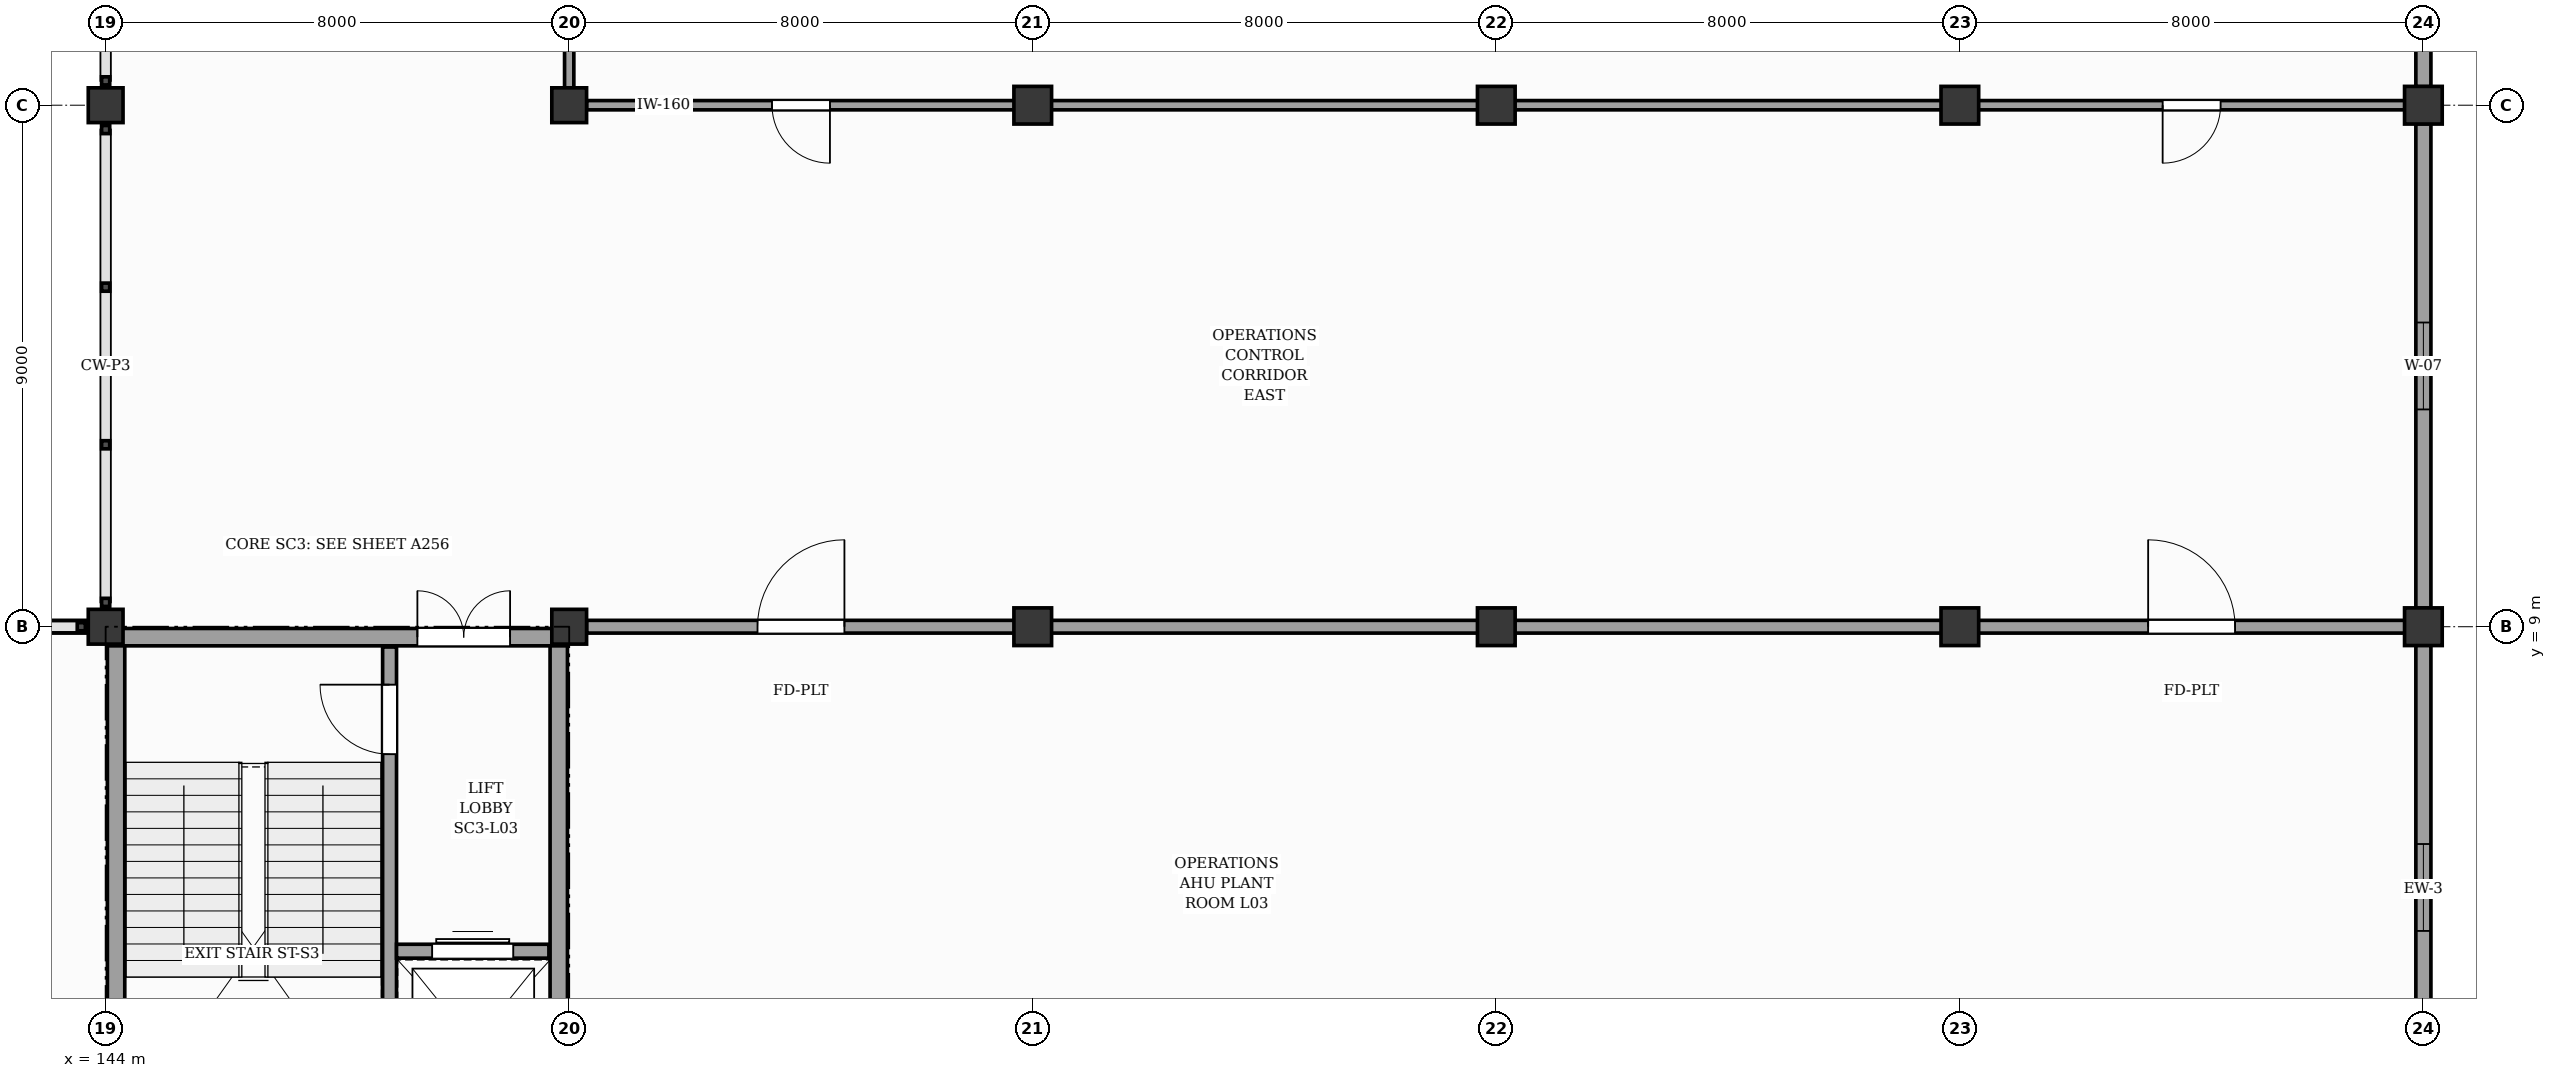
"""IFC4 building model, lengths in metres.
Left out: names, types, materials, properties, quantities, classifications, styles, units other than length and angle.
Written with IfcOpenShell. Run it as: python <this file> out.ifc"""

import sys

from ifc_helpers import new_model, si_unit, direction, frame, frame_2d, origin, origin_2d, place, context, subcontext, project, spatial, rectangle, extrude, element, fill, save


model = new_model("IFC4")
c1 = context("Model", 3, precision=1e-05, world=origin(), true_north=direction((0.0, 1.0)))
c2 = subcontext(c1, "Body", "Model", "MODEL_VIEW")
j1 = project(units=[si_unit("LENGTHUNIT", "METRE"), si_unit("PLANEANGLEUNIT", "RADIAN")], contexts=[c1])
p1 = place(None, origin())
s1 = spatial("IfcSite", under=j1, at=p1, CompositionType="ELEMENT")
p2 = place(p1, origin())
s2 = spatial("IfcBuilding", under=s1, at=p2, CompositionType="ELEMENT")
p3 = place(p2, frame((0.0, 0.0, 16.2)))
s3 = spatial("IfcBuildingStorey", under=s2, at=p3, CompositionType="ELEMENT", Elevation=16.2)
for number, where, z_axis, x_axis in (
    (1, (144.0, 9.0, 0.0), (0.0, 0.0, 1.0), (1.0, 0.0, 0.0)),
    (2, (144.0, 18.0, 0.0), (0.0, 0.0, 1.0), (1.0, 0.0, 0.0)),
    (3, (152.0, 9.0, 0.0), (0.0, 0.0, 1.0), (1.0, 0.0, 0.0)),
    (4, (152.0, 18.0, 0.0), (0.0, 0.0, 1.0), (1.0, 0.0, 0.0)),
):
    element("IfcColumn", number, at=place(p3, frame(where, z_axis=z_axis, x_axis=x_axis)), inside=s3, PredefinedType="COLUMN", context=c2, shape_type="SweptSolid", body=[
        extrude(rectangle(XDim=0.6, YDim=0.6, at=origin_2d()), origin(), (0.0, 0.0, 1.0), 4.2),
    ])
for number, where, z_axis, x_axis in (
    (5, (160.0, 9.0, 0.0), (0.0, 0.0, 1.0), (1.0, 0.0, 0.0)),
    (6, (160.0, 18.0, 0.0), (0.0, 0.0, 1.0), (1.0, 0.0, 0.0)),
    (7, (168.0, 9.0, 0.0), (0.0, 0.0, 1.0), (1.0, 0.0, 0.0)),
    (8, (168.0, 18.0, 0.0), (0.0, 0.0, 1.0), (1.0, 0.0, 0.0)),
    (9, (176.0, 9.0, 0.0), (0.0, 0.0, 1.0), (1.0, 0.0, 0.0)),
    (10, (176.0, 18.0, 0.0), (0.0, 0.0, 1.0), (1.0, 0.0, 0.0)),
    (11, (184.0, 9.0, 0.0), (0.0, 0.0, 1.0), (1.0, 0.0, 0.0)),
    (12, (184.0, 18.0, 0.0), (0.0, 0.0, 1.0), (1.0, 0.0, 0.0)),
):
    element("IfcColumn", number, at=place(p3, frame(where, z_axis=z_axis, x_axis=x_axis)), inside=s3, PredefinedType="COLUMN", context=c2, shape_type="SweptSolid", body=[
        extrude(rectangle(XDim=0.65, YDim=0.65, at=origin_2d()), origin(), (0.0, 0.0, 1.0), 4.2),
    ])
p4 = place(p3, frame((184.0, 0.27, 0.0), z_axis=(0.0, 0.0, 1.0), x_axis=(0.0, 1.0, 0.0)))
e13 = element("IfcWall", 13, at=p4, inside=s3, PredefinedType="SOLIDWALL", context=c2, shape_type="SweptSolid", body=[
    extrude(rectangle(XDim=8.41, YDim=0.26, at=frame_2d((4.205, 0.0))), origin(), (0.0, 0.0, 1.0), 3.13),
])
p5 = place(p4, frame((3.48, 0.0, 0.95)))
e14 = element("IfcOpeningElement", 14, at=p5, cuts=e13, PredefinedType="OPENING", context=c2, shape_type="SweptSolid", body=[
    extrude(rectangle(XDim=1.5, YDim=1.9, at=frame_2d((0.75, 0.95))), frame((0.0, 0.14, 0.0), z_axis=(0.0, -1.0, 0.0), x_axis=(1.0, 0.0, 0.0)), (0.0, 0.0, 1.0), 0.28),
])
p6 = place(p3, frame((184.0, 9.32, 0.0), z_axis=(0.0, 0.0, 1.0), x_axis=(0.0, 1.0, 0.0)))
e15 = element("IfcWall", 15, at=p6, inside=s3, PredefinedType="SOLIDWALL", context=c2, shape_type="SweptSolid", body=[
    extrude(rectangle(XDim=8.36, YDim=0.26, at=frame_2d((4.18, 0.0))), origin(), (0.0, 0.0, 1.0), 3.13),
])
p7 = place(p6, frame((3.43, 0.0, 0.95)))
e16 = element("IfcOpeningElement", 16, at=p7, cuts=e15, PredefinedType="OPENING", context=c2, shape_type="SweptSolid", body=[
    extrude(rectangle(XDim=1.5, YDim=1.9, at=frame_2d((0.75, 0.95))), frame((0.0, 0.14, 0.0), z_axis=(0.0, -1.0, 0.0), x_axis=(1.0, 0.0, 0.0)), (0.0, 0.0, 1.0), 0.28),
])
p8 = place(p3, frame((184.0, 18.32, 0.0), z_axis=(0.0, 0.0, 1.0), x_axis=(0.0, 1.0, 0.0)))
e17 = element("IfcWall", 17, at=p8, inside=s3, PredefinedType="SOLIDWALL", context=c2, shape_type="SweptSolid", body=[
    extrude(rectangle(XDim=8.36, YDim=0.26, at=frame_2d((4.18, 0.0))), origin(), (0.0, 0.0, 1.0), 3.13),
])
p9 = place(p8, frame((3.43, 0.0, 0.95)))
e18 = element("IfcOpeningElement", 18, at=p9, cuts=e17, PredefinedType="OPENING", context=c2, shape_type="SweptSolid", body=[
    extrude(rectangle(XDim=1.5, YDim=1.9, at=frame_2d((0.75, 0.95))), frame((0.0, 0.14, 0.0), z_axis=(0.0, -1.0, 0.0), x_axis=(1.0, 0.0, 0.0)), (0.0, 0.0, 1.0), 0.28),
])
p10 = place(p3, frame((148.9, 0.35, 0.0), z_axis=(0.0, 0.0, 1.0), x_axis=(0.0, 1.0, 0.0)))
e19 = element("IfcWall", 19, at=p10, inside=s3, PredefinedType="SHEAR", context=c2, shape_type="SweptSolid", body=[
    extrude(rectangle(XDim=8.3, YDim=0.24, at=frame_2d((4.15, 0.0))), origin(), (0.0, 0.0, 1.0), 3.92),
])
p11 = place(p10, frame((6.45, 0.0, 0.0)))
e20 = element("IfcOpeningElement", 20, at=p11, cuts=e19, PredefinedType="OPENING", context=c2, shape_type="SweptSolid", body=[
    extrude(rectangle(XDim=1.2, YDim=2.15, at=frame_2d((0.6, 1.075))), frame((0.0, 0.13, 0.0), z_axis=(0.0, -1.0, 0.0), x_axis=(1.0, 0.0, 0.0)), (0.0, 0.0, 1.0), 0.26),
])
p12 = place(p3, frame((149.02, 3.4, 0.0), z_axis=(0.0, 0.0, 1.0), x_axis=(1.0, 0.0, 0.0)))
e21 = element("IfcWall", 21, at=p12, inside=s3, PredefinedType="SHEAR", context=c2, shape_type="SweptSolid", body=[
    extrude(rectangle(XDim=2.63, YDim=0.24, at=frame_2d((1.315, 0.0))), origin(), (0.0, 0.0, 1.0), 3.92),
])
p13 = place(p12, frame((0.615, 0.0, 0.0)))
e22 = element("IfcOpeningElement", 22, at=p13, cuts=e21, PredefinedType="OPENING", context=c2, shape_type="SweptSolid", body=[
    extrude(rectangle(XDim=1.4, YDim=2.15, at=frame_2d((0.7, 1.075))), frame((0.0, 0.13, 0.0), z_axis=(0.0, -1.0, 0.0), x_axis=(1.0, 0.0, 0.0)), (0.0, 0.0, 1.0), 0.26),
])
for number, where, z_axis, x_axis in (
    (23, (144.18, 0.18, 0.0), (0.0, 0.0, 1.0), (0.0, 1.0, 0.0)),
    (24, (151.82, 0.18, 0.0), (0.0, 0.0, 1.0), (0.0, 1.0, 0.0)),
):
    element("IfcWall", number, at=place(p3, frame(where, z_axis=z_axis, x_axis=x_axis)), inside=s3, PredefinedType="SHEAR", context=c2, shape_type="SweptSolid", body=[
        extrude(rectangle(XDim=8.64, YDim=0.3, at=frame_2d((4.32, 0.0))), origin(), (0.0, 0.0, 1.0), 3.92),
    ])
p14 = place(p3, frame((144.03, 8.82, 0.0), z_axis=(0.0, 0.0, 1.0), x_axis=(1.0, 0.0, 0.0)))
e25 = element("IfcWall", 25, at=p14, inside=s3, PredefinedType="SHEAR", context=c2, shape_type="SweptSolid", body=[
    extrude(rectangle(XDim=7.94, YDim=0.3, at=frame_2d((3.97, 0.0))), origin(), (0.0, 0.0, 1.0), 3.92),
])
p15 = place(p14, frame((5.35, 0.0, 0.0)))
e26 = element("IfcOpeningElement", 26, at=p15, cuts=e25, PredefinedType="OPENING", context=c2, shape_type="SweptSolid", body=[
    extrude(rectangle(XDim=1.6, YDim=2.15, at=frame_2d((0.8, 1.075))), frame((0.0, 0.16, 0.0), z_axis=(0.0, -1.0, 0.0), x_axis=(1.0, 0.0, 0.0)), (0.0, 0.0, 1.0), 0.32),
])
p16 = place(p3, frame((136.3, 9.0, 0.0), z_axis=(0.0, 0.0, 1.0), x_axis=(1.0, 0.0, 0.0)))
e27 = element("IfcWall", 27, at=p16, inside=s3, PredefinedType="SOLIDWALL", context=c2, shape_type="SweptSolid", body=[
    extrude(rectangle(XDim=7.4, YDim=0.22, at=frame_2d((3.7, 0.0))), origin(), (0.0, 0.0, 1.0), 3.1),
])
p17 = place(p3, frame((152.3, 18.0, 0.0), z_axis=(0.0, 0.0, 1.0), x_axis=(1.0, 0.0, 0.0)))
e28 = element("IfcWall", 28, at=p17, inside=s3, PredefinedType="PARTITIONING", context=c2, shape_type="SweptSolid", body=[
    extrude(rectangle(XDim=7.4, YDim=0.16, at=frame_2d((3.7, 0.0))), origin(), (0.0, 0.0, 1.0), 3.1),
])
p18 = place(p17, frame((3.2, 0.0, 0.0)))
e29 = element("IfcOpeningElement", 29, at=p18, cuts=e28, PredefinedType="OPENING", context=c2, shape_type="SweptSolid", body=[
    extrude(rectangle(XDim=1.0, YDim=2.1, at=frame_2d((0.5, 1.05))), frame((0.0, 0.09, 0.0), z_axis=(0.0, -1.0, 0.0), x_axis=(1.0, 0.0, 0.0)), (0.0, 0.0, 1.0), 0.18),
])
for number, where, z_axis, x_axis in (
    (30, (160.3, 18.0, 0.0), (0.0, 0.0, 1.0), (1.0, 0.0, 0.0)),
    (31, (168.3, 18.0, 0.0), (0.0, 0.0, 1.0), (1.0, 0.0, 0.0)),
):
    element("IfcWall", number, at=place(p3, frame(where, z_axis=z_axis, x_axis=x_axis)), inside=s3, PredefinedType="PARTITIONING", context=c2, shape_type="SweptSolid", body=[
        extrude(rectangle(XDim=7.4, YDim=0.16, at=frame_2d((3.7, 0.0))), origin(), (0.0, 0.0, 1.0), 3.1),
    ])
p19 = place(p3, frame((176.3, 18.0, 0.0), z_axis=(0.0, 0.0, 1.0), x_axis=(1.0, 0.0, 0.0)))
e32 = element("IfcWall", 32, at=p19, inside=s3, PredefinedType="PARTITIONING", context=c2, shape_type="SweptSolid", body=[
    extrude(rectangle(XDim=7.4, YDim=0.16, at=frame_2d((3.7, 0.0))), origin(), (0.0, 0.0, 1.0), 3.1),
])
p20 = place(p19, frame((3.2, 0.0, 0.0)))
e33 = element("IfcOpeningElement", 33, at=p20, cuts=e32, PredefinedType="OPENING", context=c2, shape_type="SweptSolid", body=[
    extrude(rectangle(XDim=1.0, YDim=2.1, at=frame_2d((0.5, 1.05))), frame((0.0, 0.09, 0.0), z_axis=(0.0, -1.0, 0.0), x_axis=(1.0, 0.0, 0.0)), (0.0, 0.0, 1.0), 0.18),
])
p21 = place(p3, frame((152.0, 18.3, 0.0), z_axis=(0.0, 0.0, 1.0), x_axis=(0.0, 1.0, 0.0)))
e34 = element("IfcWall", 34, at=p21, inside=s3, PredefinedType="PARTITIONING", context=c2, shape_type="SweptSolid", body=[
    extrude(rectangle(XDim=8.4, YDim=0.16, at=frame_2d((4.2, 0.0))), origin(), (0.0, 0.0, 1.0), 3.1),
])
p22 = place(p3, frame((152.3, 9.0, 0.0), z_axis=(0.0, 0.0, 1.0), x_axis=(1.0, 0.0, 0.0)))
e35 = element("IfcWall", 35, at=p22, inside=s3, PredefinedType="SOLIDWALL", context=c2, shape_type="SweptSolid", body=[
    extrude(rectangle(XDim=7.4, YDim=0.22, at=frame_2d((3.7, 0.0))), origin(), (0.0, 0.0, 1.0), 3.1),
])
p23 = place(p22, frame((2.95, 0.0, 0.0)))
e36 = element("IfcOpeningElement", 36, at=p23, cuts=e35, PredefinedType="OPENING", context=c2, shape_type="SweptSolid", body=[
    extrude(rectangle(XDim=1.5, YDim=2.2, at=frame_2d((0.75, 1.1))), frame((0.0, 0.12, 0.0), z_axis=(0.0, -1.0, 0.0), x_axis=(1.0, 0.0, 0.0)), (0.0, 0.0, 1.0), 0.24),
])
for number, where, z_axis, x_axis in (
    (37, (160.3, 9.0, 0.0), (0.0, 0.0, 1.0), (1.0, 0.0, 0.0)),
    (38, (168.3, 9.0, 0.0), (0.0, 0.0, 1.0), (1.0, 0.0, 0.0)),
):
    element("IfcWall", number, at=place(p3, frame(where, z_axis=z_axis, x_axis=x_axis)), inside=s3, PredefinedType="SOLIDWALL", context=c2, shape_type="SweptSolid", body=[
        extrude(rectangle(XDim=7.4, YDim=0.22, at=frame_2d((3.7, 0.0))), origin(), (0.0, 0.0, 1.0), 3.1),
    ])
p24 = place(p3, frame((176.3, 9.0, 0.0), z_axis=(0.0, 0.0, 1.0), x_axis=(1.0, 0.0, 0.0)))
e39 = element("IfcWall", 39, at=p24, inside=s3, PredefinedType="SOLIDWALL", context=c2, shape_type="SweptSolid", body=[
    extrude(rectangle(XDim=7.4, YDim=0.22, at=frame_2d((3.7, 0.0))), origin(), (0.0, 0.0, 1.0), 3.1),
])
p25 = place(p24, frame((2.95, 0.0, 0.0)))
e40 = element("IfcOpeningElement", 40, at=p25, cuts=e39, PredefinedType="OPENING", context=c2, shape_type="SweptSolid", body=[
    extrude(rectangle(XDim=1.5, YDim=2.2, at=frame_2d((0.75, 1.1))), frame((0.0, 0.12, 0.0), z_axis=(0.0, -1.0, 0.0), x_axis=(1.0, 0.0, 0.0)), (0.0, 0.0, 1.0), 0.24),
])
p26 = place(p5, origin())
e41 = element("IfcWindow", 41, at=p26, inside=s3, PartitioningType="SINGLE_PANEL", PredefinedType="WINDOW", context=c2, shape_type="SweptSolid", body=[
    extrude(rectangle(XDim=1.5, YDim=1.9, at=frame_2d((0.75, 0.95))), frame((0.0, 0.03, 0.0), z_axis=(0.0, -1.0, 0.0), x_axis=(1.0, 0.0, 0.0)), (0.0, 0.0, 1.0), 0.06),
])
fill(e14, e41)
p27 = place(p7, origin())
e42 = element("IfcWindow", 42, at=p27, inside=s3, PartitioningType="SINGLE_PANEL", PredefinedType="WINDOW", context=c2, shape_type="SweptSolid", body=[
    extrude(rectangle(XDim=1.5, YDim=1.9, at=frame_2d((0.75, 0.95))), frame((0.0, 0.03, 0.0), z_axis=(0.0, -1.0, 0.0), x_axis=(1.0, 0.0, 0.0)), (0.0, 0.0, 1.0), 0.06),
])
fill(e16, e42)
p28 = place(p11, origin())
e43 = element("IfcDoor", 43, at=p28, inside=s3, OperationType="SINGLE_SWING_RIGHT", PredefinedType="DOOR", context=c2, shape_type="SweptSolid", body=[
    extrude(rectangle(XDim=1.2, YDim=2.15, at=frame_2d((0.6, 1.075))), frame((0.0, 0.025, 0.0), z_axis=(0.0, -1.0, 0.0), x_axis=(1.0, 0.0, 0.0)), (0.0, 0.0, 1.0), 0.05),
])
fill(e20, e43)
p29 = place(p13, origin())
e44 = element("IfcDoor", 44, at=p29, inside=s3, OperationType="DOUBLE_DOOR_SLIDING", PredefinedType="DOOR", context=c2, shape_type="SweptSolid", body=[
    extrude(rectangle(XDim=1.4, YDim=2.15, at=frame_2d((0.7, 1.075))), frame((0.0, 0.025, 0.0), z_axis=(0.0, -1.0, 0.0), x_axis=(1.0, 0.0, 0.0)), (0.0, 0.0, 1.0), 0.05),
])
fill(e22, e44)
p30 = place(p15, origin())
e45 = element("IfcDoor", 45, at=p30, inside=s3, OperationType="DOUBLE_DOOR_SINGLE_SWING", PredefinedType="DOOR", context=c2, shape_type="SweptSolid", body=[
    extrude(rectangle(XDim=1.6, YDim=2.15, at=frame_2d((0.8, 1.075))), frame((0.0, 0.025, 0.0), z_axis=(0.0, -1.0, 0.0), x_axis=(1.0, 0.0, 0.0)), (0.0, 0.0, 1.0), 0.05),
])
fill(e26, e45)
p31 = place(p18, frame((1.0, 0.0, 0.0), z_axis=(0.0, 0.0, 1.0), x_axis=(-1.0, 0.0, 0.0)))
e46 = element("IfcDoor", 46, at=p31, inside=s3, OperationType="SINGLE_SWING_RIGHT", PredefinedType="DOOR", context=c2, shape_type="SweptSolid", body=[
    extrude(rectangle(XDim=1.0, YDim=2.1, at=frame_2d((0.5, 1.05))), frame((0.0, 0.025, 0.0), z_axis=(0.0, -1.0, 0.0), x_axis=(1.0, 0.0, 0.0)), (0.0, 0.0, 1.0), 0.05),
])
fill(e29, e46)
p32 = place(p20, frame((1.0, 0.0, 0.0), z_axis=(0.0, 0.0, 1.0), x_axis=(-1.0, 0.0, 0.0)))
e47 = element("IfcDoor", 47, at=p32, inside=s3, OperationType="SINGLE_SWING_LEFT", PredefinedType="DOOR", context=c2, shape_type="SweptSolid", body=[
    extrude(rectangle(XDim=1.0, YDim=2.1, at=frame_2d((0.5, 1.05))), frame((0.0, 0.025, 0.0), z_axis=(0.0, -1.0, 0.0), x_axis=(1.0, 0.0, 0.0)), (0.0, 0.0, 1.0), 0.05),
])
fill(e33, e47)
p33 = place(p23, origin())
e48 = element("IfcDoor", 48, at=p33, inside=s3, OperationType="SINGLE_SWING_RIGHT", PredefinedType="DOOR", context=c2, shape_type="SweptSolid", body=[
    extrude(rectangle(XDim=1.5, YDim=2.2, at=frame_2d((0.75, 1.1))), frame((0.0, 0.025, 0.0), z_axis=(0.0, -1.0, 0.0), x_axis=(1.0, 0.0, 0.0)), (0.0, 0.0, 1.0), 0.05),
])
fill(e36, e48)
p34 = place(p25, origin())
e49 = element("IfcDoor", 49, at=p34, inside=s3, OperationType="SINGLE_SWING_LEFT", PredefinedType="DOOR", context=c2, shape_type="SweptSolid", body=[
    extrude(rectangle(XDim=1.5, YDim=2.2, at=frame_2d((0.75, 1.1))), frame((0.0, 0.025, 0.0), z_axis=(0.0, -1.0, 0.0), x_axis=(1.0, 0.0, 0.0)), (0.0, 0.0, 1.0), 0.05),
])
fill(e40, e49)
save(model, sys.argv[1])
